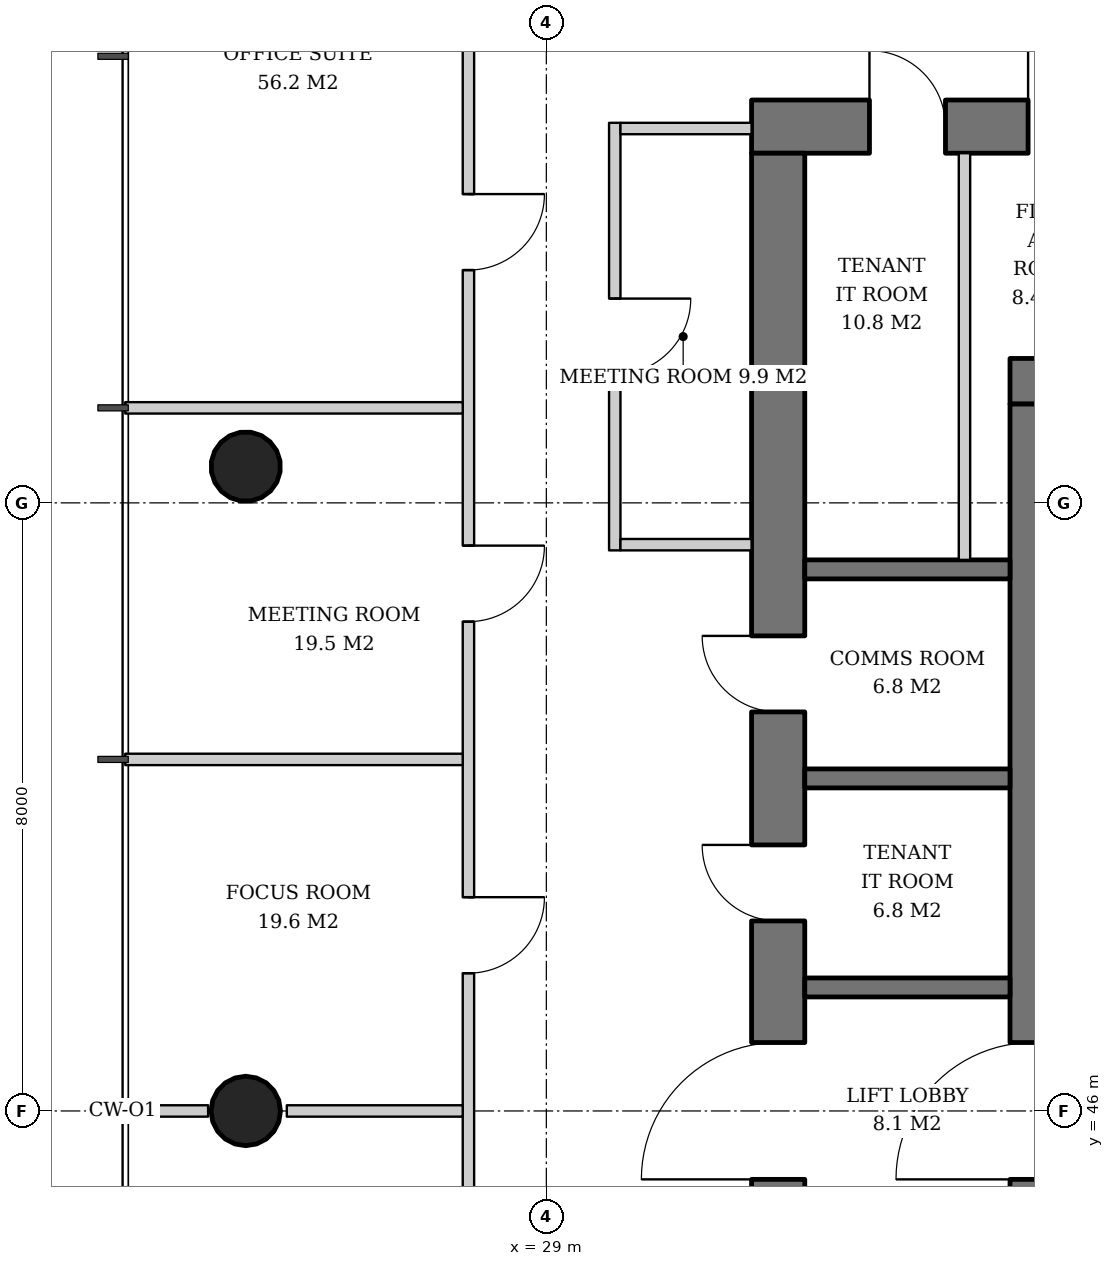
"""IFC4 building model, lengths in metres.
Left out: names, types, materials, properties, quantities, classifications, styles, units other than length and angle.
Written with IfcOpenShell. Run it as: python <this file> out.ifc"""

import sys

from ifc_helpers import new_model, si_unit, direction, frame, frame_2d, origin, origin_2d, place, context, subcontext, project, spatial, rectangle, hollow_circle, extrude, element, fill, save


model = new_model("IFC4")
c1 = context("Model", 3, precision=1e-05, world=origin(), true_north=direction((0.0, 1.0)))
c2 = subcontext(c1, "Body", "Model", "MODEL_VIEW")
j1 = project(units=[si_unit("LENGTHUNIT", "METRE"), si_unit("PLANEANGLEUNIT", "RADIAN")], contexts=[c1])
p1 = place(None, origin())
s1 = spatial("IfcSite", under=j1, at=p1, CompositionType="ELEMENT")
p2 = place(p1, origin())
s2 = spatial("IfcBuilding", under=s1, at=p2, CompositionType="ELEMENT")
p3 = place(p2, frame((0.0, 0.0, 146.4)))
s3 = spatial("IfcBuildingStorey", under=s2, at=p3, CompositionType="ELEMENT", Elevation=146.4)
p4 = place(p3, frame((25.007, 54.496, 0.0), z_axis=(0.031974442509, -0.015923015547, 0.999361842679), x_axis=(0.445775033553, 0.895145027055, 0.0)))
e1 = element("IfcColumn", 1, at=p4, inside=s3, PredefinedType="COLUMN", context=c2, shape_type="SweptSolid", body=[
    extrude(hollow_circle(Radius=0.457, WallThickness=0.03, at=origin_2d()), origin(), (0.0, 0.0, 1.0), 3.802),
])
p5 = place(p3, frame((25.007, 46.0, 0.0), z_axis=(0.031978496719, 0.0, 0.999488557087), x_axis=(0.0, 1.0, 0.0)))
e2 = element("IfcColumn", 2, at=p5, inside=s3, PredefinedType="COLUMN", context=c2, shape_type="SweptSolid", body=[
    extrude(hollow_circle(Radius=0.457, WallThickness=0.03, at=origin_2d()), origin(), (0.0, 0.0, 1.0), 3.802),
])
p6 = place(p3, frame((35.1, 55.6, 0.0), z_axis=(0.0, 0.0, 1.0), x_axis=(1.0, 0.0, 0.0)))
e3 = element("IfcWall", 3, at=p6, inside=s3, PredefinedType="SHEAR", context=c2, shape_type="SweptSolid", body=[
    extrude(rectangle(XDim=19.8, YDim=0.6, at=frame_2d((9.9, 0.0))), origin(), (0.0, 0.0, 1.0), 3.8),
])
p7 = place(p6, frame((14.54, 0.0, 0.0)))
e4 = element("IfcOpeningElement", 4, at=p7, cuts=e3, PredefinedType="OPENING", context=c2, shape_type="SweptSolid", body=[
    extrude(rectangle(XDim=1.0, YDim=2.1, at=frame_2d((0.5, 1.05))), frame((0.0, 0.31, 0.0), z_axis=(0.0, -1.0, 0.0), x_axis=(1.0, 0.0, 0.0)), (0.0, 0.0, 1.0), 0.62),
])
p8 = place(p6, frame((2.425, 0.0, 0.0)))
e5 = element("IfcOpeningElement", 5, at=p8, cuts=e3, PredefinedType="OPENING", context=c2, shape_type="SweptSolid", body=[
    extrude(rectangle(XDim=1.0, YDim=2.1, at=frame_2d((0.5, 1.05))), frame((0.0, 0.31, 0.0), z_axis=(0.0, -1.0, 0.0), x_axis=(1.0, 0.0, 0.0)), (0.0, 0.0, 1.0), 0.62),
])
p9 = place(p3, frame((35.4, 36.7, 0.0), z_axis=(0.0, 0.0, 1.0), x_axis=(0.0, 1.0, 0.0)))
e6 = element("IfcWall", 6, at=p9, inside=s3, PredefinedType="SHEAR", context=c2, shape_type="SweptSolid", body=[
    extrude(rectangle(XDim=18.6, YDim=0.6, at=frame_2d((9.3, 0.0))), origin(), (0.0, 0.0, 1.0), 3.8),
])
p10 = place(p9, frame((8.4, 0.0, 0.0)))
e7 = element("IfcOpeningElement", 7, at=p10, cuts=e6, PredefinedType="OPENING", context=c2, shape_type="SweptSolid", body=[
    extrude(rectangle(XDim=1.8, YDim=2.4, at=frame_2d((0.9, 1.2))), frame((0.0, 0.31, 0.0), z_axis=(0.0, -1.0, 0.0), x_axis=(1.0, 0.0, 0.0)), (0.0, 0.0, 1.0), 0.62),
])
p11 = place(p3, frame((31.7, 58.95, 0.0), z_axis=(0.0, 0.0, 1.0), x_axis=(1.0, 0.0, 0.0)))
e8 = element("IfcWall", 8, at=p11, inside=s3, PredefinedType="SHEAR", context=c2, shape_type="SweptSolid", body=[
    extrude(rectangle(XDim=26.6, YDim=0.7, at=frame_2d((13.3, 0.0))), origin(), (0.0, 0.0, 1.0), 3.8),
])
p12 = place(p11, frame((17.94, 0.0, 0.0)))
e9 = element("IfcOpeningElement", 9, at=p12, cuts=e8, PredefinedType="OPENING", context=c2, shape_type="SweptSolid", body=[
    extrude(rectangle(XDim=1.0, YDim=2.1, at=frame_2d((0.5, 1.05))), frame((0.0, 0.36, 0.0), z_axis=(0.0, -1.0, 0.0), x_axis=(1.0, 0.0, 0.0)), (0.0, 0.0, 1.0), 0.72),
])
p13 = place(p11, frame((5.825, 0.0, 0.0)))
e10 = element("IfcOpeningElement", 10, at=p13, cuts=e8, PredefinedType="OPENING", context=c2, shape_type="SweptSolid", body=[
    extrude(rectangle(XDim=1.0, YDim=2.1, at=frame_2d((0.5, 1.05))), frame((0.0, 0.36, 0.0), z_axis=(0.0, -1.0, 0.0), x_axis=(1.0, 0.0, 0.0)), (0.0, 0.0, 1.0), 0.72),
])
p14 = place(p11, frame((1.551, 0.0, 0.0)))
e11 = element("IfcOpeningElement", 11, at=p14, cuts=e8, PredefinedType="OPENING", context=c2, shape_type="SweptSolid", body=[
    extrude(rectangle(XDim=1.0, YDim=2.1, at=frame_2d((0.5, 1.05))), frame((0.0, 0.36, 0.0), z_axis=(0.0, -1.0, 0.0), x_axis=(1.0, 0.0, 0.0)), (0.0, 0.0, 1.0), 0.72),
])
p15 = place(p11, frame((3.638, 0.0, 0.0)))
e12 = element("IfcOpeningElement", 12, at=p15, cuts=e8, PredefinedType="OPENING", context=c2, shape_type="SweptSolid", body=[
    extrude(rectangle(XDim=1.0, YDim=2.1, at=frame_2d((0.5, 1.05))), frame((0.0, 0.36, 0.0), z_axis=(0.0, -1.0, 0.0), x_axis=(1.0, 0.0, 0.0)), (0.0, 0.0, 1.0), 0.72),
])
p16 = place(p11, frame((8.342, 0.0, 0.0)))
e13 = element("IfcOpeningElement", 13, at=p16, cuts=e8, PredefinedType="OPENING", context=c2, shape_type="SweptSolid", body=[
    extrude(rectangle(XDim=1.0, YDim=2.1, at=frame_2d((0.5, 1.05))), frame((0.0, 0.36, 0.0), z_axis=(0.0, -1.0, 0.0), x_axis=(1.0, 0.0, 0.0)), (0.0, 0.0, 1.0), 0.72),
])
p17 = place(p11, frame((11.626, 0.0, 0.0)))
e14 = element("IfcOpeningElement", 14, at=p17, cuts=e8, PredefinedType="OPENING", context=c2, shape_type="SweptSolid", body=[
    extrude(rectangle(XDim=1.0, YDim=2.1, at=frame_2d((0.5, 1.05))), frame((0.0, 0.36, 0.0), z_axis=(0.0, -1.0, 0.0), x_axis=(1.0, 0.0, 0.0)), (0.0, 0.0, 1.0), 0.72),
])
p18 = place(p11, frame((14.862, 0.0, 0.0)))
e15 = element("IfcOpeningElement", 15, at=p18, cuts=e8, PredefinedType="OPENING", context=c2, shape_type="SweptSolid", body=[
    extrude(rectangle(XDim=1.0, YDim=2.1, at=frame_2d((0.5, 1.05))), frame((0.0, 0.36, 0.0), z_axis=(0.0, -1.0, 0.0), x_axis=(1.0, 0.0, 0.0)), (0.0, 0.0, 1.0), 0.72),
])
p19 = place(p11, frame((20.9, 0.0, 0.0)))
e16 = element("IfcOpeningElement", 16, at=p19, cuts=e8, PredefinedType="OPENING", context=c2, shape_type="SweptSolid", body=[
    extrude(rectangle(XDim=1.0, YDim=2.1, at=frame_2d((0.5, 1.05))), frame((0.0, 0.36, 0.0), z_axis=(0.0, -1.0, 0.0), x_axis=(1.0, 0.0, 0.0)), (0.0, 0.0, 1.0), 0.72),
])
p20 = place(p11, frame((23.75, 0.0, 0.0)))
e17 = element("IfcOpeningElement", 17, at=p20, cuts=e8, PredefinedType="OPENING", context=c2, shape_type="SweptSolid", body=[
    extrude(rectangle(XDim=1.0, YDim=2.1, at=frame_2d((0.5, 1.05))), frame((0.0, 0.36, 0.0), z_axis=(0.0, -1.0, 0.0), x_axis=(1.0, 0.0, 0.0)), (0.0, 0.0, 1.0), 0.72),
])
p21 = place(p3, frame((32.05, 33.4, 0.0), z_axis=(0.0, 0.0, 1.0), x_axis=(0.0, 1.0, 0.0)))
e18 = element("IfcWall", 18, at=p21, inside=s3, PredefinedType="SHEAR", context=c2, shape_type="SweptSolid", body=[
    extrude(rectangle(XDim=25.2, YDim=0.7, at=frame_2d((12.6, 0.0))), origin(), (0.0, 0.0, 1.0), 3.8),
])
p22 = place(p21, frame((11.7, 0.0, 0.0)))
e19 = element("IfcOpeningElement", 19, at=p22, cuts=e18, PredefinedType="OPENING", context=c2, shape_type="SweptSolid", body=[
    extrude(rectangle(XDim=1.8, YDim=2.4, at=frame_2d((0.9, 1.2))), frame((0.0, 0.36, 0.0), z_axis=(0.0, -1.0, 0.0), x_axis=(1.0, 0.0, 0.0)), (0.0, 0.0, 1.0), 0.72),
])
p23 = place(p21, frame((3.6, 0.0, 0.0)))
e20 = element("IfcOpeningElement", 20, at=p23, cuts=e18, PredefinedType="OPENING", context=c2, shape_type="SweptSolid", body=[
    extrude(rectangle(XDim=1.0, YDim=2.1, at=frame_2d((0.5, 1.05))), frame((0.0, 0.36, 0.0), z_axis=(0.0, -1.0, 0.0), x_axis=(1.0, 0.0, 0.0)), (0.0, 0.0, 1.0), 0.72),
])
p24 = place(p21, frame((6.35, 0.0, 0.0)))
e21 = element("IfcOpeningElement", 21, at=p24, cuts=e18, PredefinedType="OPENING", context=c2, shape_type="SweptSolid", body=[
    extrude(rectangle(XDim=1.0, YDim=2.1, at=frame_2d((0.5, 1.05))), frame((0.0, 0.36, 0.0), z_axis=(0.0, -1.0, 0.0), x_axis=(1.0, 0.0, 0.0)), (0.0, 0.0, 1.0), 0.72),
])
p25 = place(p21, frame((9.1, 0.0, 0.0)))
e22 = element("IfcOpeningElement", 22, at=p25, cuts=e18, PredefinedType="OPENING", context=c2, shape_type="SweptSolid", body=[
    extrude(rectangle(XDim=1.0, YDim=2.1, at=frame_2d((0.5, 1.05))), frame((0.0, 0.36, 0.0), z_axis=(0.0, -1.0, 0.0), x_axis=(1.0, 0.0, 0.0)), (0.0, 0.0, 1.0), 0.72),
])
p26 = place(p21, frame((15.1, 0.0, 0.0)))
e23 = element("IfcOpeningElement", 23, at=p26, cuts=e18, PredefinedType="OPENING", context=c2, shape_type="SweptSolid", body=[
    extrude(rectangle(XDim=1.0, YDim=2.1, at=frame_2d((0.5, 1.05))), frame((0.0, 0.36, 0.0), z_axis=(0.0, -1.0, 0.0), x_axis=(1.0, 0.0, 0.0)), (0.0, 0.0, 1.0), 0.72),
])
p27 = place(p21, frame((17.85, 0.0, 0.0)))
e24 = element("IfcOpeningElement", 24, at=p27, cuts=e18, PredefinedType="OPENING", context=c2, shape_type="SweptSolid", body=[
    extrude(rectangle(XDim=1.0, YDim=2.1, at=frame_2d((0.5, 1.05))), frame((0.0, 0.36, 0.0), z_axis=(0.0, -1.0, 0.0), x_axis=(1.0, 0.0, 0.0)), (0.0, 0.0, 1.0), 0.72),
])
for number, where, z_axis, x_axis in (
    (25, (32.4, 47.625, 0.0), (0.0, 0.0, 1.0), (1.0, 0.0, 0.0)),
    (26, (32.4, 50.375, 0.0), (0.0, 0.0, 1.0), (1.0, 0.0, 0.0)),
    (27, (32.4, 53.125, 0.0), (0.0, 0.0, 1.0), (1.0, 0.0, 0.0)),
):
    element("IfcWall", number, at=place(p3, frame(where, z_axis=z_axis, x_axis=x_axis)), inside=s3, PredefinedType="SHEAR", context=c2, shape_type="SweptSolid", body=[
        extrude(rectangle(XDim=2.7, YDim=0.25, at=frame_2d((1.35, 0.0))), origin(), (0.0, 0.0, 1.0), 3.8),
    ])
p28 = place(p3, frame((34.501, 53.25, 0.0), z_axis=(0.0, 0.0, 1.0), x_axis=(0.0, 1.0, 0.0)))
e28 = element("IfcWall", 28, at=p28, inside=s3, PredefinedType="SOLIDWALL", context=c2, shape_type="SweptSolid", body=[
    extrude(rectangle(XDim=5.35, YDim=0.15, at=frame_2d((2.675, 0.0))), origin(), (0.0, 0.0, 1.0), 3.62),
])
p29 = place(p3, frame((29.9, 59.0, 0.0), z_axis=(0.0, 0.0, 1.0), x_axis=(0.0, -1.0, 0.0)))
e29 = element("IfcWall", 29, at=p29, inside=s3, PredefinedType="PARTITIONING", context=c2, shape_type="SweptSolid", body=[
    extrude(rectangle(XDim=5.625, YDim=0.15, at=frame_2d((2.812, 0.0))), origin(), (0.0, 0.0, 1.0), 2.72),
])
p30 = place(p29, frame((2.312, 0.0, 0.0)))
e30 = element("IfcOpeningElement", 30, at=p30, cuts=e29, PredefinedType="OPENING", context=c2, shape_type="SweptSolid", body=[
    extrude(rectangle(XDim=1.0, YDim=2.1, at=frame_2d((0.5, 1.05))), frame((0.0, 0.085, 0.0), z_axis=(0.0, -1.0, 0.0), x_axis=(1.0, 0.0, 0.0)), (0.0, 0.0, 1.0), 0.17),
])
p31 = place(p3, frame((31.7, 58.925, 0.0), z_axis=(0.0, 0.0, 1.0), x_axis=(-1.0, 0.0, 0.0)))
e31 = element("IfcWall", 31, at=p31, inside=s3, PredefinedType="PARTITIONING", context=c2, shape_type="SweptSolid", body=[
    extrude(rectangle(XDim=1.725, YDim=0.15, at=frame_2d((0.862, 0.0))), origin(), (0.0, 0.0, 1.0), 2.72),
])
p32 = place(p3, frame((31.7, 53.45, 0.0), z_axis=(0.0, 0.0, 1.0), x_axis=(-1.0, 0.0, 0.0)))
e32 = element("IfcWall", 32, at=p32, inside=s3, PredefinedType="PARTITIONING", context=c2, shape_type="SweptSolid", body=[
    extrude(rectangle(XDim=1.725, YDim=0.15, at=frame_2d((0.862, 0.0))), origin(), (0.0, 0.0, 1.0), 3.62),
])
p33 = place(p3, frame((27.975, 61.112, 0.0), z_axis=(0.0, 0.0, 1.0), x_axis=(0.0, -1.0, 0.0)))
e33 = element("IfcWall", 33, at=p33, inside=s3, PredefinedType="PARTITIONING", context=c2, shape_type="SweptSolid", body=[
    extrude(rectangle(XDim=30.223, YDim=0.15, at=frame_2d((15.112, 0.0))), origin(), (0.0, 0.0, 1.0), 2.72),
])
p34 = place(p33, frame((3.049, 0.0, 0.0)))
e34 = element("IfcOpeningElement", 34, at=p34, cuts=e33, PredefinedType="OPENING", context=c2, shape_type="SweptSolid", body=[
    extrude(rectangle(XDim=1.0, YDim=2.1, at=frame_2d((0.5, 1.05))), frame((0.0, 0.085, 0.0), z_axis=(0.0, -1.0, 0.0), x_axis=(1.0, 0.0, 0.0)), (0.0, 0.0, 1.0), 0.17),
])
p35 = place(p33, frame((7.674, 0.0, 0.0)))
e35 = element("IfcOpeningElement", 35, at=p35, cuts=e33, PredefinedType="OPENING", context=c2, shape_type="SweptSolid", body=[
    extrude(rectangle(XDim=1.0, YDim=2.1, at=frame_2d((0.5, 1.05))), frame((0.0, 0.085, 0.0), z_axis=(0.0, -1.0, 0.0), x_axis=(1.0, 0.0, 0.0)), (0.0, 0.0, 1.0), 0.17),
])
p36 = place(p33, frame((12.299, 0.0, 0.0)))
e36 = element("IfcOpeningElement", 36, at=p36, cuts=e33, PredefinedType="OPENING", context=c2, shape_type="SweptSolid", body=[
    extrude(rectangle(XDim=1.0, YDim=2.1, at=frame_2d((0.5, 1.05))), frame((0.0, 0.085, 0.0), z_axis=(0.0, -1.0, 0.0), x_axis=(1.0, 0.0, 0.0)), (0.0, 0.0, 1.0), 0.17),
])
p37 = place(p33, frame((17.024, 0.0, 0.0)))
e37 = element("IfcOpeningElement", 37, at=p37, cuts=e33, PredefinedType="OPENING", context=c2, shape_type="SweptSolid", body=[
    extrude(rectangle(XDim=0.8, YDim=2.1, at=frame_2d((0.4, 1.05))), frame((0.0, 0.085, 0.0), z_axis=(0.0, -1.0, 0.0), x_axis=(1.0, 0.0, 0.0)), (0.0, 0.0, 1.0), 0.17),
])
p38 = place(p33, frame((21.549, 0.0, 0.0)))
e38 = element("IfcOpeningElement", 38, at=p38, cuts=e33, PredefinedType="OPENING", context=c2, shape_type="SweptSolid", body=[
    extrude(rectangle(XDim=1.0, YDim=2.1, at=frame_2d((0.5, 1.05))), frame((0.0, 0.085, 0.0), z_axis=(0.0, -1.0, 0.0), x_axis=(1.0, 0.0, 0.0)), (0.0, 0.0, 1.0), 0.17),
])
p39 = place(p33, frame((26.274, 0.0, 0.0)))
e39 = element("IfcOpeningElement", 39, at=p39, cuts=e33, PredefinedType="OPENING", context=c2, shape_type="SweptSolid", body=[
    extrude(rectangle(XDim=0.8, YDim=2.1, at=frame_2d((0.4, 1.05))), frame((0.0, 0.085, 0.0), z_axis=(0.0, -1.0, 0.0), x_axis=(1.0, 0.0, 0.0)), (0.0, 0.0, 1.0), 0.17),
])
for number, where, z_axis, x_axis in (
    (40, (27.9, 55.25, 0.0), (0.0, 0.0, 1.0), (-1.0, 0.0, 0.0)),
    (41, (27.9, 50.625, 0.0), (0.0, 0.0, 1.0), (-1.0, 0.0, 0.0)),
):
    element("IfcWall", number, at=place(p3, frame(where, z_axis=z_axis, x_axis=x_axis)), inside=s3, PredefinedType="PARTITIONING", context=c2, shape_type="SweptSolid", body=[
        extrude(rectangle(XDim=4.44, YDim=0.15, at=frame_2d((2.22, 0.0))), origin(), (0.0, 0.0, 1.0), 2.82),
    ])
p40 = place(p3, frame((27.9, 46.0, 0.0), z_axis=(0.0, 0.0, 1.0), x_axis=(-1.0, 0.0, 0.0)))
e42 = element("IfcWall", 42, at=p40, inside=s3, PredefinedType="PARTITIONING", context=c2, shape_type="SweptSolid", body=[
    extrude(rectangle(XDim=2.314, YDim=0.15, at=frame_2d((1.157, 0.0))), origin(), (0.0, 0.0, 1.0), 3.62),
])
p41 = place(p3, frame((24.55, 46.0, 0.0), z_axis=(0.0, 0.0, 1.0), x_axis=(-1.0, 0.0, 0.0)))
e43 = element("IfcWall", 43, at=p41, inside=s3, PredefinedType="PARTITIONING", context=c2, shape_type="SweptSolid", body=[
    extrude(rectangle(XDim=1.09, YDim=0.15, at=frame_2d((0.545, 0.0))), origin(), (0.0, 0.0, 1.0), 3.62),
])
p42 = place(p10, origin())
e44 = element("IfcDoor", 44, at=p42, inside=s3, OperationType="DOUBLE_DOOR_SINGLE_SWING", PredefinedType="DOOR", context=c2, shape_type="SweptSolid", body=[
    extrude(rectangle(XDim=1.8, YDim=2.4, at=frame_2d((0.9, 1.2))), frame((0.0, 0.025, 0.0), z_axis=(0.0, -1.0, 0.0), x_axis=(1.0, 0.0, 0.0)), (0.0, 0.0, 1.0), 0.05),
])
fill(e7, e44)
p43 = place(p22, origin())
e45 = element("IfcDoor", 45, at=p43, inside=s3, OperationType="DOUBLE_DOOR_SINGLE_SWING", PredefinedType="DOOR", context=c2, shape_type="SweptSolid", body=[
    extrude(rectangle(XDim=1.8, YDim=2.4, at=frame_2d((0.9, 1.2))), frame((0.0, 0.025, 0.0), z_axis=(0.0, -1.0, 0.0), x_axis=(1.0, 0.0, 0.0)), (0.0, 0.0, 1.0), 0.05),
])
fill(e19, e45)
p44 = place(p26, origin())
e46 = element("IfcDoor", 46, at=p44, inside=s3, OperationType="SINGLE_SWING_RIGHT", PredefinedType="DOOR", context=c2, shape_type="SweptSolid", body=[
    extrude(rectangle(XDim=1.0, YDim=2.1, at=frame_2d((0.5, 1.05))), frame((0.0, -0.29, 0.0), z_axis=(0.0, -1.0, 0.0), x_axis=(1.0, 0.0, 0.0)), (0.0, 0.0, 1.0), 0.05),
])
fill(e23, e46)
p45 = place(p27, origin())
e47 = element("IfcDoor", 47, at=p45, inside=s3, OperationType="SINGLE_SWING_RIGHT", PredefinedType="DOOR", context=c2, shape_type="SweptSolid", body=[
    extrude(rectangle(XDim=1.0, YDim=2.1, at=frame_2d((0.5, 1.05))), frame((0.0, -0.29, 0.0), z_axis=(0.0, -1.0, 0.0), x_axis=(1.0, 0.0, 0.0)), (0.0, 0.0, 1.0), 0.05),
])
fill(e24, e47)
p46 = place(p14, origin())
e48 = element("IfcDoor", 48, at=p46, inside=s3, OperationType="SINGLE_SWING_LEFT", PredefinedType="DOOR", context=c2, shape_type="SweptSolid", body=[
    extrude(rectangle(XDim=1.0, YDim=2.1, at=frame_2d((0.5, 1.05))), frame((0.0, -0.29, 0.0), z_axis=(0.0, -1.0, 0.0), x_axis=(1.0, 0.0, 0.0)), (0.0, 0.0, 1.0), 0.05),
])
fill(e11, e48)
p47 = place(p15, origin())
e49 = element("IfcDoor", 49, at=p47, inside=s3, OperationType="SINGLE_SWING_LEFT", PredefinedType="DOOR", context=c2, shape_type="SweptSolid", body=[
    extrude(rectangle(XDim=1.0, YDim=2.1, at=frame_2d((0.5, 1.05))), frame((0.0, -0.29, 0.0), z_axis=(0.0, -1.0, 0.0), x_axis=(1.0, 0.0, 0.0)), (0.0, 0.0, 1.0), 0.05),
])
fill(e12, e49)
p48 = place(p30, origin())
e50 = element("IfcDoor", 50, at=p48, inside=s3, OperationType="SINGLE_SWING_LEFT", PredefinedType="DOOR", context=c2, shape_type="SweptSolid", body=[
    extrude(rectangle(XDim=1.0, YDim=2.1, at=frame_2d((0.5, 1.05))), frame((0.0, 0.025, 0.0), z_axis=(0.0, -1.0, 0.0), x_axis=(1.0, 0.0, 0.0)), (0.0, 0.0, 1.0), 0.05),
])
fill(e30, e50)
p49 = place(p34, origin())
e51 = element("IfcDoor", 51, at=p49, inside=s3, OperationType="SINGLE_SWING_LEFT", PredefinedType="DOOR", context=c2, shape_type="SweptSolid", body=[
    extrude(rectangle(XDim=1.0, YDim=2.1, at=frame_2d((0.5, 1.05))), frame((0.0, 0.025, 0.0), z_axis=(0.0, -1.0, 0.0), x_axis=(1.0, 0.0, 0.0)), (0.0, 0.0, 1.0), 0.05),
])
fill(e34, e51)
p50 = place(p35, origin())
e52 = element("IfcDoor", 52, at=p50, inside=s3, OperationType="SINGLE_SWING_LEFT", PredefinedType="DOOR", context=c2, shape_type="SweptSolid", body=[
    extrude(rectangle(XDim=1.0, YDim=2.1, at=frame_2d((0.5, 1.05))), frame((0.0, 0.025, 0.0), z_axis=(0.0, -1.0, 0.0), x_axis=(1.0, 0.0, 0.0)), (0.0, 0.0, 1.0), 0.05),
])
fill(e35, e52)
p51 = place(p36, origin())
e53 = element("IfcDoor", 53, at=p51, inside=s3, OperationType="SINGLE_SWING_LEFT", PredefinedType="DOOR", context=c2, shape_type="SweptSolid", body=[
    extrude(rectangle(XDim=1.0, YDim=2.1, at=frame_2d((0.5, 1.05))), frame((0.0, 0.025, 0.0), z_axis=(0.0, -1.0, 0.0), x_axis=(1.0, 0.0, 0.0)), (0.0, 0.0, 1.0), 0.05),
])
fill(e36, e53)
save(model, sys.argv[1])
